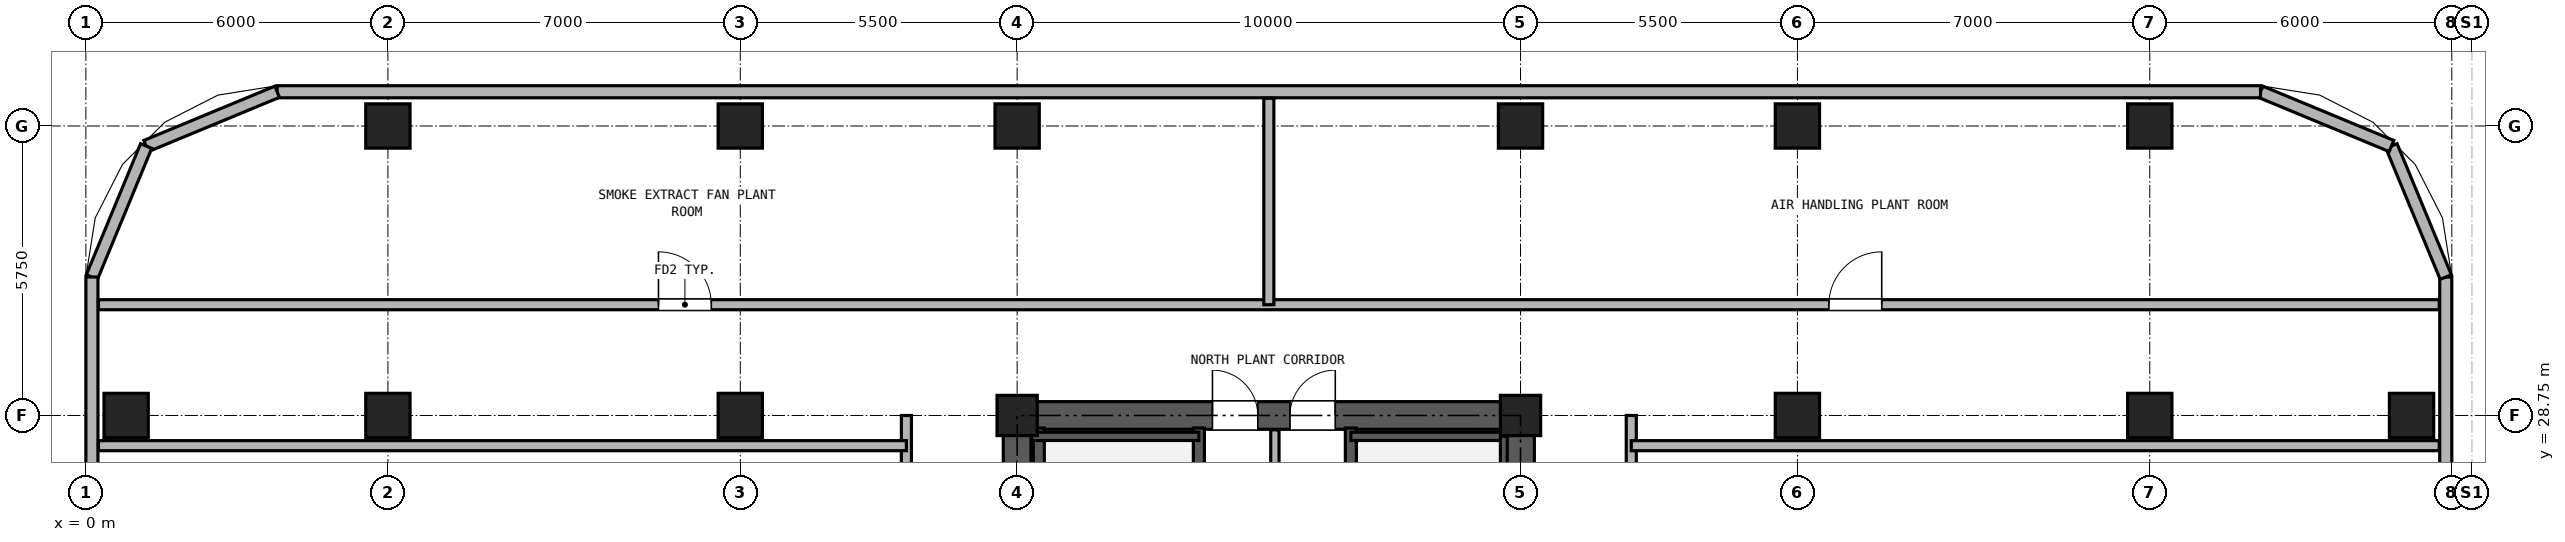
"""IFC4 building model, lengths in metres.
Left out: names, types, materials, properties, quantities, classifications, styles, units other than length and angle.
Written with IfcOpenShell. Run it as: python <this file> out.ifc"""

import sys

from ifc_helpers import new_model, si_unit, direction, frame, frame_2d, origin, origin_2d, place, context, subcontext, project, spatial, rectangle, hollow_rectangle, extrude, source, transform, mapped, element, fill, save


model = new_model("IFC4")
c1 = context("Model", 3, precision=1e-05, world=origin(), true_north=direction((0.0, 1.0)))
c2 = subcontext(c1, "Body", "Model", "MODEL_VIEW")
j1 = project(units=[si_unit("LENGTHUNIT", "METRE"), si_unit("PLANEANGLEUNIT", "RADIAN")], contexts=[c1])
p1 = place(None, origin())
s1 = spatial("IfcSite", under=j1, at=p1, CompositionType="ELEMENT")
p2 = place(p1, origin())
s2 = spatial("IfcBuilding", under=s1, at=p2, CompositionType="ELEMENT")
p3 = place(p2, frame((0.0, 0.0, 143.9)))
s3 = spatial("IfcBuildingStorey", under=s2, at=p3, CompositionType="ELEMENT", Elevation=143.9)
m1 = source(origin(), c2, "Body", "SweptSolid", [
    extrude(hollow_rectangle(XDim=0.88, YDim=0.88, WallThickness=0.05, at=origin_2d()), origin(), (0.0, 0.0, 1.0), 4.25),
])
for number, where, z_axis, x_axis in (
    (1, (6.0, 34.5, 0.0), (0.0, 0.0, 1.0), (1.0, 0.0, 0.0)),
    (2, (13.0, 34.5, 0.0), (0.0, 0.0, 1.0), (1.0, 0.0, 0.0)),
    (3, (18.5, 34.5, 0.0), (0.0, 0.0, 1.0), (1.0, 0.0, 0.0)),
    (4, (28.5, 34.5, 0.0), (0.0, 0.0, 1.0), (1.0, 0.0, 0.0)),
    (5, (34.0, 34.5, 0.0), (0.0, 0.0, 1.0), (1.0, 0.0, 0.0)),
    (6, (41.0, 34.5, 0.0), (0.0, 0.0, 1.0), (1.0, 0.0, 0.0)),
    (7, (0.8, 28.75, 0.0), (0.0, 0.0, 1.0), (1.0, 0.0, 0.0)),
    (8, (46.2, 28.75, 0.0), (0.0, 0.0, 1.0), (1.0, 0.0, 0.0)),
    (9, (6.0, 28.75, 0.0), (0.0, 0.0, 1.0), (1.0, 0.0, 0.0)),
    (10, (13.0, 28.75, 0.0), (0.0, 0.0, 1.0), (1.0, 0.0, 0.0)),
):
    element("IfcColumn", number, at=place(p3, frame(where, z_axis=z_axis, x_axis=x_axis)), inside=s3, PredefinedType="COLUMN", context=c2, shape_type="MappedRepresentation", body=[
        mapped(m1, transform((0.0, 0.0, 0.0), x_axis=(1.0, 0.0, 0.0), y_axis=(0.0, 1.0, 0.0), z_axis=(0.0, 0.0, 1.0), scale=1.0)),
    ])
m2 = source(origin(), c2, "Body", "SweptSolid", [
    extrude(hollow_rectangle(XDim=0.8, YDim=0.8, WallThickness=0.045, at=origin_2d()), origin(), (0.0, 0.0, 1.0), 4.25),
])
for number, where, z_axis, x_axis in (
    (11, (18.5, 28.75, 0.0), (0.0, 0.0, 1.0), (1.0, 0.0, 0.0)),
    (12, (28.5, 28.75, 0.0), (0.0, 0.0, 1.0), (1.0, 0.0, 0.0)),
):
    element("IfcColumn", number, at=place(p3, frame(where, z_axis=z_axis, x_axis=x_axis)), inside=s3, PredefinedType="COLUMN", context=c2, shape_type="MappedRepresentation", body=[
        mapped(m2, transform((0.0, 0.0, 0.0), x_axis=(1.0, 0.0, 0.0), y_axis=(0.0, 1.0, 0.0), z_axis=(0.0, 0.0, 1.0), scale=1.0)),
    ])
for number, where, z_axis, x_axis in (
    (13, (34.0, 28.75, 0.0), (0.0, 0.0, 1.0), (1.0, 0.0, 0.0)),
    (14, (41.0, 28.75, 0.0), (0.0, 0.0, 1.0), (1.0, 0.0, 0.0)),
):
    element("IfcColumn", number, at=place(p3, frame(where, z_axis=z_axis, x_axis=x_axis)), inside=s3, PredefinedType="COLUMN", context=c2, shape_type="MappedRepresentation", body=[
        mapped(m1, transform((0.0, 0.0, 0.0), x_axis=(1.0, 0.0, 0.0), y_axis=(0.0, 1.0, 0.0), z_axis=(0.0, 0.0, 1.0), scale=1.0)),
    ])
p4 = place(p3, frame((46.88, 3.8, 0.0), z_axis=(0.0, 0.0, 1.0), x_axis=(0.0, 1.0, 0.0)))
e15 = element("IfcWall", 15, at=p4, inside=s3, PredefinedType="SOLIDWALL", context=c2, shape_type="SweptSolid", body=[
    extrude(rectangle(XDim=27.7, YDim=0.24, at=frame_2d((13.85, 0.0))), origin(), (0.0, 0.0, 1.0), 4.25),
])
for number, where, z_axis, x_axis in (
    (16, (46.88, 31.5, 0.0), (0.0, 0.0, 1.0), (-0.383, 0.924, 0.0)),
    (17, (45.802, 34.102, 0.0), (0.0, 0.0, 1.0), (-0.924, 0.383, 0.0)),
):
    element("IfcWall", number, at=place(p3, frame(where, z_axis=z_axis, x_axis=x_axis)), inside=s3, PredefinedType="SOLIDWALL", context=c2, shape_type="SweptSolid", body=[
        extrude(rectangle(XDim=2.817, YDim=0.24, at=frame_2d((1.408, 0.0))), origin(), (0.0, 0.0, 1.0), 4.25),
    ])
p5 = place(p3, frame((43.2, 35.18, 0.0), z_axis=(0.0, 0.0, 1.0), x_axis=(-1.0, 0.0, 0.0)))
e18 = element("IfcWall", 18, at=p5, inside=s3, PredefinedType="SOLIDWALL", context=c2, shape_type="SweptSolid", body=[
    extrude(rectangle(XDim=39.4, YDim=0.24, at=frame_2d((19.7, 0.0))), origin(), (0.0, 0.0, 1.0), 4.25),
])
for number, where, z_axis, x_axis in (
    (19, (3.8, 35.18, 0.0), (0.0, 0.0, 1.0), (-0.924, -0.383, 0.0)),
    (20, (1.198, 34.102, 0.0), (0.0, 0.0, 1.0), (-0.383, -0.924, 0.0)),
):
    element("IfcWall", number, at=place(p3, frame(where, z_axis=z_axis, x_axis=x_axis)), inside=s3, PredefinedType="SOLIDWALL", context=c2, shape_type="SweptSolid", body=[
        extrude(rectangle(XDim=2.817, YDim=0.24, at=frame_2d((1.408, 0.0))), origin(), (0.0, 0.0, 1.0), 4.25),
    ])
p6 = place(p3, frame((0.12, 31.5, 0.0), z_axis=(0.0, 0.0, 1.0), x_axis=(0.0, -1.0, 0.0)))
e21 = element("IfcWall", 21, at=p6, inside=s3, PredefinedType="SOLIDWALL", context=c2, shape_type="SweptSolid", body=[
    extrude(rectangle(XDim=27.7, YDim=0.24, at=frame_2d((13.85, 0.0))), origin(), (0.0, 0.0, 1.0), 4.25),
])
p7 = place(p3, frame((18.225, 28.75, 0.0), z_axis=(0.0, 0.0, 1.0), x_axis=(1.0, 0.0, 0.0)))
e22 = element("IfcWall", 22, at=p7, inside=s3, PredefinedType="SHEAR", context=c2, shape_type="SweptSolid", body=[
    extrude(rectangle(XDim=10.55, YDim=0.55, at=frame_2d((5.275, 0.0))), origin(), (0.0, 0.0, 1.0), 4.25),
])
p8 = place(p7, frame((4.155, 0.0, 0.0)))
e23 = element("IfcOpeningElement", 23, at=p8, cuts=e22, PredefinedType="OPENING", context=c2, shape_type="SweptSolid", body=[
    extrude(rectangle(XDim=0.9, YDim=2.05, at=frame_2d((0.45, 1.025))), frame((0.0, 0.285, 0.0), z_axis=(0.0, -1.0, 0.0), x_axis=(1.0, 0.0, 0.0)), (0.0, 0.0, 1.0), 0.57),
])
p9 = place(p7, frame((5.695, 0.0, 0.0)))
e24 = element("IfcOpeningElement", 24, at=p9, cuts=e22, PredefinedType="OPENING", context=c2, shape_type="SweptSolid", body=[
    extrude(rectangle(XDim=0.9, YDim=2.05, at=frame_2d((0.45, 1.025))), frame((0.0, 0.285, 0.0), z_axis=(0.0, -1.0, 0.0), x_axis=(1.0, 0.0, 0.0)), (0.0, 0.0, 1.0), 0.57),
])
p10 = place(p3, frame((18.5, 11.775, 0.0), z_axis=(0.0, 0.0, 1.0), x_axis=(0.0, 1.0, 0.0)))
e25 = element("IfcWall", 25, at=p10, inside=s3, PredefinedType="SHEAR", context=c2, shape_type="SweptSolid", body=[
    extrude(rectangle(XDim=16.7, YDim=0.55, at=frame_2d((8.35, 0.0))), origin(), (0.0, 0.0, 1.0), 4.25),
])
p11 = place(p10, frame((7.375, 0.0, 0.0)))
e26 = element("IfcOpeningElement", 26, at=p11, cuts=e25, PredefinedType="OPENING", context=c2, shape_type="SweptSolid", body=[
    extrude(rectangle(XDim=1.15, YDim=2.2, at=frame_2d((0.575, 1.1))), frame((0.0, 0.285, 0.0), z_axis=(0.0, -1.0, 0.0), x_axis=(1.0, 0.0, 0.0)), (0.0, 0.0, 1.0), 0.57),
])
p12 = place(p3, frame((28.5, 11.775, 0.0), z_axis=(0.0, 0.0, 1.0), x_axis=(0.0, 1.0, 0.0)))
e27 = element("IfcWall", 27, at=p12, inside=s3, PredefinedType="SHEAR", context=c2, shape_type="SweptSolid", body=[
    extrude(rectangle(XDim=16.7, YDim=0.55, at=frame_2d((8.35, 0.0))), origin(), (0.0, 0.0, 1.0), 4.25),
])
p13 = place(p12, frame((7.375, 0.0, 0.0)))
e28 = element("IfcOpeningElement", 28, at=p13, cuts=e27, PredefinedType="OPENING", context=c2, shape_type="SweptSolid", body=[
    extrude(rectangle(XDim=1.15, YDim=2.2, at=frame_2d((0.575, 1.1))), frame((0.0, 0.285, 0.0), z_axis=(0.0, -1.0, 0.0), x_axis=(1.0, 0.0, 0.0)), (0.0, 0.0, 1.0), 0.57),
])
for number, where, z_axis, x_axis in (
    (29, (18.93, 21.39, 0.0), (0.0, 0.0, 1.0), (0.0, 1.0, 0.0)),
    (30, (22.11, 21.39, 0.0), (0.0, 0.0, 1.0), (0.0, 1.0, 0.0)),
    (31, (25.13, 21.39, 0.0), (0.0, 0.0, 1.0), (0.0, 1.0, 0.0)),
):
    element("IfcWall", number, at=place(p3, frame(where, z_axis=z_axis, x_axis=x_axis)), inside=s3, PredefinedType="SOLIDWALL", context=c2, shape_type="SweptSolid", body=[
        extrude(rectangle(XDim=7.11, YDim=0.22, at=frame_2d((3.555, 0.0))), origin(), (0.0, 0.0, 1.0), 4.25),
    ])
p14 = place(p3, frame((18.785, 28.335, 0.0), z_axis=(0.0, 0.0, 1.0), x_axis=(1.0, 0.0, 0.0)))
e32 = element("IfcWall", 32, at=p14, inside=s3, PredefinedType="PARTITIONING", context=c2, shape_type="SweptSolid", body=[
    extrude(rectangle(XDim=3.325, YDim=0.165, at=frame_2d((1.663, 0.0))), origin(), (0.0, 0.0, 1.0), 4.25),
])
p15 = place(p3, frame((25.13, 28.335, 0.0), z_axis=(0.0, 0.0, 1.0), x_axis=(1.0, 0.0, 0.0)))
e33 = element("IfcWall", 33, at=p15, inside=s3, PredefinedType="PARTITIONING", context=c2, shape_type="SweptSolid", body=[
    extrude(rectangle(XDim=3.085, YDim=0.165, at=frame_2d((1.542, 0.0))), origin(), (0.0, 0.0, 1.0), 4.25),
])
p16 = place(p3, frame((28.167, 21.39, 0.0), z_axis=(0.0, 0.0, 1.0), x_axis=(0.0, 1.0, 0.0)))
e34 = element("IfcWall", 34, at=p16, inside=s3, PredefinedType="PARTITIONING", context=c2, shape_type="SweptSolid", body=[
    extrude(rectangle(XDim=6.945, YDim=0.135, at=frame_2d((3.473, 0.0))), origin(), (0.0, 0.0, 1.0), 4.25),
])
p17 = place(p3, frame((23.62, 24.4, 0.0), z_axis=(0.0, 0.0, 1.0), x_axis=(0.0, 1.0, 0.0)))
e35 = element("IfcWall", 35, at=p17, inside=s3, PredefinedType="PARTITIONING", context=c2, shape_type="SweptSolid", body=[
    extrude(rectangle(XDim=4.065, YDim=0.165, at=frame_2d((2.033, 0.0))), origin(), (0.0, 0.0, 1.0), 4.25),
])
p18 = place(p3, frame((0.25, 30.95, 0.0), z_axis=(0.0, 0.0, 1.0), x_axis=(1.0, 0.0, 0.0)))
e36 = element("IfcWall", 36, at=p18, inside=s3, PredefinedType="PARTITIONING", context=c2, shape_type="SweptSolid", body=[
    extrude(rectangle(XDim=46.5, YDim=0.2, at=frame_2d((23.25, 0.0))), origin(), (0.0, 0.0, 1.0), 4.25),
])
p19 = place(p18, frame((11.125, 0.0, 0.0)))
e37 = element("IfcOpeningElement", 37, at=p19, cuts=e36, PredefinedType="OPENING", context=c2, shape_type="SweptSolid", body=[
    extrude(rectangle(XDim=1.05, YDim=2.15, at=frame_2d((0.525, 1.075))), frame((0.0, 0.11, 0.0), z_axis=(0.0, -1.0, 0.0), x_axis=(1.0, 0.0, 0.0)), (0.0, 0.0, 1.0), 0.22),
])
p20 = place(p18, frame((34.375, 0.0, 0.0)))
e38 = element("IfcOpeningElement", 38, at=p20, cuts=e36, PredefinedType="OPENING", context=c2, shape_type="SweptSolid", body=[
    extrude(rectangle(XDim=1.05, YDim=2.15, at=frame_2d((0.525, 1.075))), frame((0.0, 0.11, 0.0), z_axis=(0.0, -1.0, 0.0), x_axis=(1.0, 0.0, 0.0)), (0.0, 0.0, 1.0), 0.22),
])
p21 = place(p3, frame((16.3, 8.9, 0.0), z_axis=(0.0, 0.0, 1.0), x_axis=(0.0, 1.0, 0.0)))
e39 = element("IfcWall", 39, at=p21, inside=s3, PredefinedType="PARTITIONING", context=c2, shape_type="SweptSolid", body=[
    extrude(rectangle(XDim=19.85, YDim=0.2, at=frame_2d((9.925, 0.0))), origin(), (0.0, 0.0, 1.0), 4.25),
])
p22 = place(p21, frame((10.6, 0.0, 0.0)))
e40 = element("IfcOpeningElement", 40, at=p22, cuts=e39, PredefinedType="OPENING", context=c2, shape_type="SweptSolid", body=[
    extrude(rectangle(XDim=1.05, YDim=2.15, at=frame_2d((0.525, 1.075))), frame((0.0, 0.11, 0.0), z_axis=(0.0, -1.0, 0.0), x_axis=(1.0, 0.0, 0.0)), (0.0, 0.0, 1.0), 0.22),
])
p23 = place(p3, frame((30.7, 8.9, 0.0), z_axis=(0.0, 0.0, 1.0), x_axis=(0.0, 1.0, 0.0)))
e41 = element("IfcWall", 41, at=p23, inside=s3, PredefinedType="PARTITIONING", context=c2, shape_type="SweptSolid", body=[
    extrude(rectangle(XDim=19.85, YDim=0.2, at=frame_2d((9.925, 0.0))), origin(), (0.0, 0.0, 1.0), 4.25),
])
p24 = place(p23, frame((10.6, 0.0, 0.0)))
e42 = element("IfcOpeningElement", 42, at=p24, cuts=e41, PredefinedType="OPENING", context=c2, shape_type="SweptSolid", body=[
    extrude(rectangle(XDim=1.5, YDim=2.25, at=frame_2d((0.75, 1.125))), frame((0.0, 0.11, 0.0), z_axis=(0.0, -1.0, 0.0), x_axis=(1.0, 0.0, 0.0)), (0.0, 0.0, 1.0), 0.22),
])
p25 = place(p3, frame((23.5, 30.95, 0.0), z_axis=(0.0, 0.0, 1.0), x_axis=(0.0, 1.0, 0.0)))
e43 = element("IfcWall", 43, at=p25, inside=s3, PredefinedType="PARTITIONING", context=c2, shape_type="SweptSolid", body=[
    extrude(rectangle(XDim=4.1, YDim=0.2, at=frame_2d((2.05, 0.0))), origin(), (0.0, 0.0, 1.0), 4.25),
])
for number, where, z_axis, x_axis in (
    (44, (0.25, 28.15, 0.0), (0.0, 0.0, 1.0), (1.0, 0.0, 0.0)),
    (45, (30.7, 28.15, 0.0), (0.0, 0.0, 1.0), (1.0, 0.0, 0.0)),
):
    element("IfcWall", number, at=place(p3, frame(where, z_axis=z_axis, x_axis=x_axis)), inside=s3, PredefinedType="PARTITIONING", context=c2, shape_type="SweptSolid", body=[
        extrude(rectangle(XDim=16.05, YDim=0.2, at=frame_2d((8.025, 0.0))), origin(), (0.0, 0.0, 1.0), 4.25),
    ])
p26 = place(p8, origin())
e46 = element("IfcDoor", 46, at=p26, inside=s3, OperationType="SINGLE_SWING_LEFT", PredefinedType="DOOR", context=c2, shape_type="SweptSolid", body=[
    extrude(rectangle(XDim=0.9, YDim=2.05, at=frame_2d((0.45, 1.025))), frame((0.0, 0.025, 0.0), z_axis=(0.0, -1.0, 0.0), x_axis=(1.0, 0.0, 0.0)), (0.0, 0.0, 1.0), 0.05),
])
fill(e23, e46)
p27 = place(p9, origin())
e47 = element("IfcDoor", 47, at=p27, inside=s3, OperationType="SINGLE_SWING_RIGHT", PredefinedType="DOOR", context=c2, shape_type="SweptSolid", body=[
    extrude(rectangle(XDim=0.9, YDim=2.05, at=frame_2d((0.45, 1.025))), frame((0.0, 0.025, 0.0), z_axis=(0.0, -1.0, 0.0), x_axis=(1.0, 0.0, 0.0)), (0.0, 0.0, 1.0), 0.05),
])
fill(e24, e47)
p28 = place(p19, origin())
e48 = element("IfcDoor", 48, at=p28, inside=s3, OperationType="SINGLE_SWING_LEFT", PredefinedType="DOOR", context=c2, shape_type="SweptSolid", body=[
    extrude(rectangle(XDim=1.05, YDim=2.15, at=frame_2d((0.525, 1.075))), frame((0.0, 0.025, 0.0), z_axis=(0.0, -1.0, 0.0), x_axis=(1.0, 0.0, 0.0)), (0.0, 0.0, 1.0), 0.05),
])
fill(e37, e48)
p29 = place(p20, origin())
e49 = element("IfcDoor", 49, at=p29, inside=s3, OperationType="SINGLE_SWING_RIGHT", PredefinedType="DOOR", context=c2, shape_type="SweptSolid", body=[
    extrude(rectangle(XDim=1.05, YDim=2.15, at=frame_2d((0.525, 1.075))), frame((0.0, 0.025, 0.0), z_axis=(0.0, -1.0, 0.0), x_axis=(1.0, 0.0, 0.0)), (0.0, 0.0, 1.0), 0.05),
])
fill(e38, e49)
save(model, sys.argv[1])
